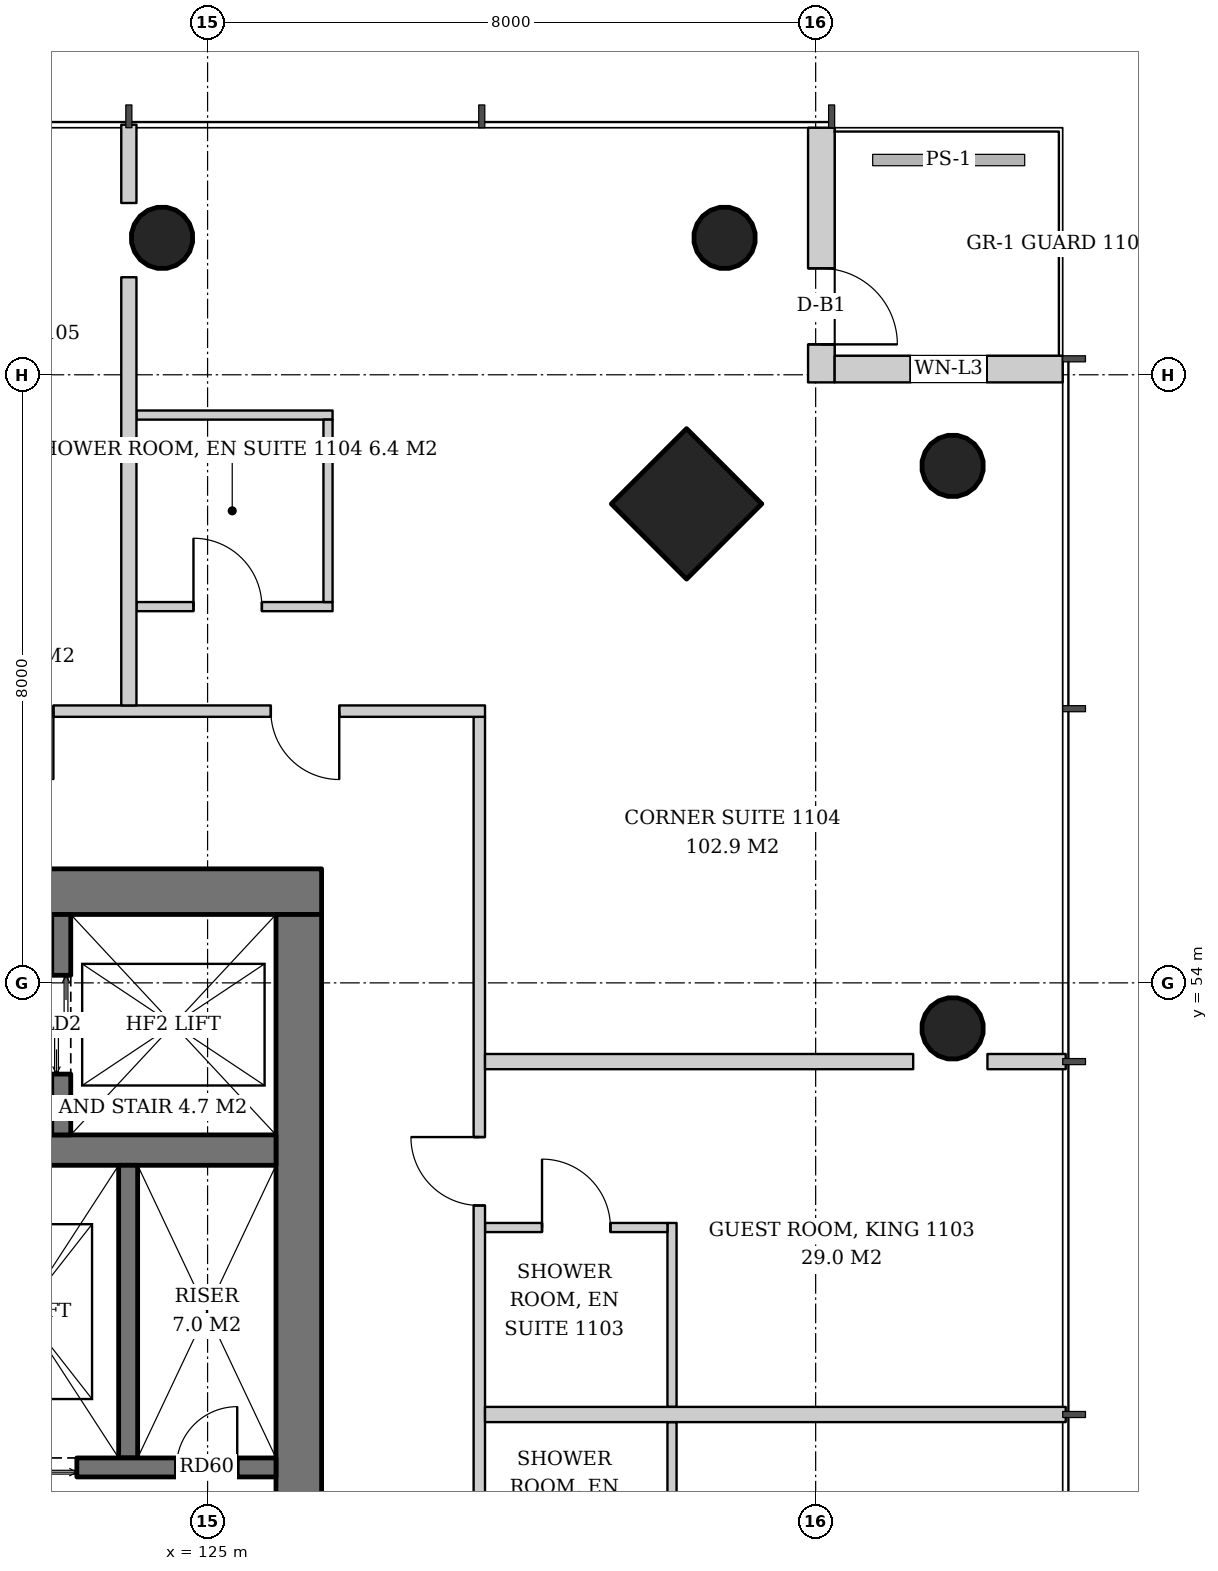
"""IFC4 building model, lengths in metres.
Left out: names, types, materials, properties, quantities, classifications, styles, units other than length and angle.
Written with IfcOpenShell. Run it as: python <this file> out.ifc"""

import sys

from ifc_helpers import new_model, si_unit, direction, frame, frame_2d, origin, origin_2d, place, context, subcontext, project, spatial, rectangle, hollow_circle, extrude, element, fill, save


model = new_model("IFC4")
c1 = context("Model", 3, precision=1e-05, world=origin(), true_north=direction((0.0, 1.0)))
c2 = subcontext(c1, "Body", "Model", "MODEL_VIEW")
j1 = project(units=[si_unit("LENGTHUNIT", "METRE"), si_unit("PLANEANGLEUNIT", "RADIAN")], contexts=[c1])
p1 = place(None, origin())
s1 = spatial("IfcSite", under=j1, at=p1, CompositionType="ELEMENT")
p2 = place(p1, origin())
s2 = spatial("IfcBuilding", under=s1, at=p2, CompositionType="ELEMENT")
p3 = place(p2, frame((0.0, 0.0, 47.6)))
s3 = spatial("IfcBuildingStorey", under=s2, at=p3, CompositionType="ELEMENT", Elevation=47.6)
p4 = place(p3, frame((131.354, 60.354, 0.0), z_axis=(-0.043032401563, -0.043032401563, 0.998146494675), x_axis=(0.707106781187, -0.707106781187, 0.0)))
e1 = element("IfcColumn", 1, at=p4, inside=s3, PredefinedType="COLUMN", context=c2, shape_type="SweptSolid", body=[
    extrude(rectangle(XDim=1.4, YDim=1.4, at=origin_2d()), origin(), (0.0, 0.0, 1.0), 3.807),
])
p5 = place(p3, frame((134.854, 60.854, 0.0), z_axis=(-0.043032401563, -0.043032401563, 0.998146494675), x_axis=(0.707106781187, -0.707106781187, 0.0)))
e2 = element("IfcColumn", 2, at=p5, inside=s3, PredefinedType="COLUMN", context=c2, shape_type="SweptSolid", body=[
    extrude(hollow_circle(Radius=0.406, WallThickness=0.03, at=origin_2d()), origin(), (0.0, 0.0, 1.0), 3.807),
])
p6 = place(p3, frame((134.854, 53.427, 0.0), z_axis=(-0.043062285527, -0.021563230905, 0.998839660125), x_axis=(0.44774654769, -0.894160516368, 0.0)))
e3 = element("IfcColumn", 3, at=p6, inside=s3, PredefinedType="COLUMN", context=c2, shape_type="SweptSolid", body=[
    extrude(hollow_circle(Radius=0.406, WallThickness=0.03, at=origin_2d()), origin(), (0.0, 0.0, 1.0), 3.804),
])
p7 = place(p3, frame((131.854, 63.854, 0.0), z_axis=(-0.043032401563, -0.043032401563, 0.998146494675), x_axis=(0.707106781187, -0.707106781187, 0.0)))
e4 = element("IfcColumn", 4, at=p7, inside=s3, PredefinedType="COLUMN", context=c2, shape_type="SweptSolid", body=[
    extrude(hollow_circle(Radius=0.406, WallThickness=0.03, at=origin_2d()), origin(), (0.0, 0.0, 1.0), 3.807),
])
p8 = place(p3, frame((124.427, 63.854, 0.0), z_axis=(-0.021563230905, -0.043062285527, 0.998839660125), x_axis=(0.894160516368, -0.44774654769, 0.0)))
e5 = element("IfcColumn", 5, at=p8, inside=s3, PredefinedType="COLUMN", context=c2, shape_type="SweptSolid", body=[
    extrude(hollow_circle(Radius=0.406, WallThickness=0.03, at=origin_2d()), origin(), (0.0, 0.0, 1.0), 3.804),
])
p9 = place(p3, frame((107.5, 55.2, 0.0), z_axis=(0.0, 0.0, 1.0), x_axis=(1.0, 0.0, 0.0)))
e6 = element("IfcWall", 6, at=p9, inside=s3, PredefinedType="SHEAR", context=c2, shape_type="SweptSolid", body=[
    extrude(rectangle(XDim=19.0, YDim=0.6, at=frame_2d((9.5, 0.0))), origin(), (0.0, 0.0, 1.0), 3.8),
])
p10 = place(p9, frame((14.14, 0.0, 0.0)))
e7 = element("IfcOpeningElement", 7, at=p10, cuts=e6, PredefinedType="OPENING", context=c2, shape_type="SweptSolid", body=[
    extrude(rectangle(XDim=1.0, YDim=2.1, at=frame_2d((0.5, 1.05))), frame((0.0, 0.31, 0.0), z_axis=(0.0, -1.0, 0.0), x_axis=(1.0, 0.0, 0.0)), (0.0, 0.0, 1.0), 0.62),
])
p11 = place(p9, frame((1.675, 0.0, 0.0)))
e8 = element("IfcOpeningElement", 8, at=p11, cuts=e6, PredefinedType="OPENING", context=c2, shape_type="SweptSolid", body=[
    extrude(rectangle(XDim=1.0, YDim=2.1, at=frame_2d((0.5, 1.05))), frame((0.0, 0.31, 0.0), z_axis=(0.0, -1.0, 0.0), x_axis=(1.0, 0.0, 0.0)), (0.0, 0.0, 1.0), 0.62),
])
p12 = place(p9, frame((3.587, 0.0, 0.0)))
e9 = element("IfcOpeningElement", 9, at=p12, cuts=e6, PredefinedType="OPENING", context=c2, shape_type="SweptSolid", body=[
    extrude(rectangle(XDim=1.0, YDim=2.1, at=frame_2d((0.5, 1.05))), frame((0.0, 0.31, 0.0), z_axis=(0.0, -1.0, 0.0), x_axis=(1.0, 0.0, 0.0)), (0.0, 0.0, 1.0), 0.62),
])
p13 = place(p3, frame((126.2, 37.1, 0.0), z_axis=(0.0, 0.0, 1.0), x_axis=(0.0, 1.0, 0.0)))
e10 = element("IfcWall", 10, at=p13, inside=s3, PredefinedType="SHEAR", context=c2, shape_type="SweptSolid", body=[
    extrude(rectangle(XDim=17.8, YDim=0.6, at=frame_2d((8.9, 0.0))), origin(), (0.0, 0.0, 1.0), 3.8),
])
p14 = place(p13, frame((8.0, 0.0, 0.0)))
e11 = element("IfcOpeningElement", 11, at=p14, cuts=e10, PredefinedType="OPENING", context=c2, shape_type="SweptSolid", body=[
    extrude(rectangle(XDim=1.8, YDim=2.4, at=frame_2d((0.9, 1.2))), frame((0.0, 0.31, 0.0), z_axis=(0.0, -1.0, 0.0), x_axis=(1.0, 0.0, 0.0)), (0.0, 0.0, 1.0), 0.62),
])
p15 = place(p3, frame((108.1, 51.8, 0.0), z_axis=(0.0, 0.0, 1.0), x_axis=(1.0, 0.0, 0.0)))
e12 = element("IfcWall", 12, at=p15, inside=s3, PredefinedType="SHEAR", context=c2, shape_type="SweptSolid", body=[
    extrude(rectangle(XDim=17.8, YDim=0.4, at=frame_2d((8.9, 0.0))), origin(), (0.0, 0.0, 1.0), 3.8),
])
p16 = place(p3, frame((133.075, 65.25, 0.0), z_axis=(0.0, 0.0, 1.0), x_axis=(0.0, -1.0, 0.0)))
e13 = element("IfcWall", 13, at=p16, inside=s3, PredefinedType="SOLIDWALL", context=c2, shape_type="SweptSolid", body=[
    extrude(rectangle(XDim=3.35, YDim=0.35, at=frame_2d((1.675, 0.0))), origin(), (0.0, 0.0, 1.0), 3.6),
])
p17 = place(p16, frame((1.85, 0.0, 0.0)))
e14 = element("IfcOpeningElement", 14, at=p17, cuts=e13, PredefinedType="OPENING", context=c2, shape_type="SweptSolid", body=[
    extrude(rectangle(XDim=1.0, YDim=2.4, at=frame_2d((0.5, 1.2))), frame((0.0, 0.185, 0.0), z_axis=(0.0, -1.0, 0.0), x_axis=(1.0, 0.0, 0.0)), (0.0, 0.0, 1.0), 0.37),
])
p18 = place(p3, frame((133.25, 62.075, 0.0), z_axis=(0.0, 0.0, 1.0), x_axis=(1.0, 0.0, 0.0)))
e15 = element("IfcWall", 15, at=p18, inside=s3, PredefinedType="SOLIDWALL", context=c2, shape_type="SweptSolid", body=[
    extrude(rectangle(XDim=3.0, YDim=0.35, at=frame_2d((1.5, 0.0))), origin(), (0.0, 0.0, 1.0), 3.6),
])
p19 = place(p18, frame((1.0, 0.0, 0.9)))
e16 = element("IfcOpeningElement", 16, at=p19, cuts=e15, PredefinedType="OPENING", context=c2, shape_type="SweptSolid", body=[
    extrude(rectangle(XDim=1.0, YDim=2.4, at=frame_2d((0.5, 1.2))), frame((0.0, 0.185, 0.0), z_axis=(0.0, -1.0, 0.0), x_axis=(1.0, 0.0, 0.0)), (0.0, 0.0, 1.0), 0.37),
])
p20 = place(p3, frame((123.075, 52.0, 0.0), z_axis=(0.0, 0.0, 1.0), x_axis=(0.0, 1.0, 0.0)))
e17 = element("IfcWall", 17, at=p20, inside=s3, PredefinedType="SHEAR", context=c2, shape_type="SweptSolid", body=[
    extrude(rectangle(XDim=2.9, YDim=0.25, at=frame_2d((1.45, 0.0))), origin(), (0.0, 0.0, 1.0), 3.8),
])
p21 = place(p20, frame((0.8, 0.0, 0.0)))
e18 = element("IfcOpeningElement", 18, at=p21, cuts=e17, PredefinedType="OPENING", context=c2, shape_type="SweptSolid", body=[
    extrude(rectangle(XDim=1.3, YDim=2.2, at=frame_2d((0.65, 1.1))), frame((0.0, 0.135, 0.0), z_axis=(0.0, -1.0, 0.0), x_axis=(1.0, 0.0, 0.0)), (0.0, 0.0, 1.0), 0.27),
])
p22 = place(p3, frame((123.955, 47.75, 0.0), z_axis=(0.0, 0.0, 1.0), x_axis=(0.0, 1.0, 0.0)))
e19 = element("IfcWall", 19, at=p22, inside=s3, PredefinedType="SHEAR", context=c2, shape_type="SweptSolid", body=[
    extrude(rectangle(XDim=3.85, YDim=0.25, at=frame_2d((1.925, 0.0))), origin(), (0.0, 0.0, 1.0), 3.8),
])
p23 = place(p3, frame((121.33, 47.625, 0.0), z_axis=(0.0, 0.0, 1.0), x_axis=(1.0, 0.0, 0.0)))
e20 = element("IfcWall", 20, at=p23, inside=s3, PredefinedType="SHEAR", context=c2, shape_type="SweptSolid", body=[
    extrude(rectangle(XDim=4.57, YDim=0.25, at=frame_2d((2.285, 0.0))), origin(), (0.0, 0.0, 1.0), 3.8),
])
p24 = place(p23, frame((0.55, 0.0, 0.0)))
e21 = element("IfcOpeningElement", 21, at=p24, cuts=e20, PredefinedType="OPENING", context=c2, shape_type="SweptSolid", body=[
    extrude(rectangle(XDim=1.4, YDim=2.4, at=frame_2d((0.7, 1.2))), frame((0.0, 0.135, 0.0), z_axis=(0.0, -1.0, 0.0), x_axis=(1.0, 0.0, 0.0)), (0.0, 0.0, 1.0), 0.27),
])
p25 = place(p23, frame((3.26, 0.0, 0.0)))
e22 = element("IfcOpeningElement", 22, at=p25, cuts=e20, PredefinedType="OPENING", context=c2, shape_type="SweptSolid", body=[
    extrude(rectangle(XDim=0.8, YDim=2.0, at=frame_2d((0.4, 1.0))), frame((0.0, 0.135, 0.0), z_axis=(0.0, -1.0, 0.0), x_axis=(1.0, 0.0, 0.0)), (0.0, 0.0, 1.0), 0.27),
])
for number, where, z_axis, x_axis in (
    (23, (131.11, 45.802, 0.0), (0.0, 0.0, 1.0), (0.0, 1.0, 0.0)),
    (24, (131.11, 48.421, 0.0), (0.0, 0.0, 1.0), (0.0, 1.0, 0.0)),
):
    element("IfcWall", number, at=place(p3, frame(where, z_axis=z_axis, x_axis=x_axis)), inside=s3, PredefinedType="PARTITIONING", context=c2, shape_type="SweptSolid", body=[
        extrude(rectangle(XDim=2.42, YDim=0.12, at=frame_2d((1.21, 0.0))), origin(), (0.0, 0.0, 1.0), 2.847),
    ])
p26 = place(p3, frame((128.65, 50.781, 0.0), z_axis=(0.0, 0.0, 1.0), x_axis=(1.0, 0.0, 0.0)))
e25 = element("IfcWall", 25, at=p26, inside=s3, PredefinedType="PARTITIONING", context=c2, shape_type="SweptSolid", body=[
    extrude(rectangle(XDim=2.4, YDim=0.12, at=frame_2d((1.2, 0.0))), origin(), (0.0, 0.0, 1.0), 3.6),
])
p27 = place(p26, frame((0.75, 0.0, 0.0)))
e26 = element("IfcOpeningElement", 26, at=p27, cuts=e25, PredefinedType="OPENING", context=c2, shape_type="SweptSolid", body=[
    extrude(rectangle(XDim=0.9, YDim=2.1, at=frame_2d((0.45, 1.05))), frame((0.0, 0.07, 0.0), z_axis=(0.0, -1.0, 0.0), x_axis=(1.0, 0.0, 0.0)), (0.0, 0.0, 1.0), 0.14),
])
p28 = place(p3, frame((128.575, 34.35, 0.0), z_axis=(0.0, 0.0, 1.0), x_axis=(0.0, 1.0, 0.0)))
e27 = element("IfcWall", 27, at=p28, inside=s3, PredefinedType="PARTITIONING", context=c2, shape_type="SweptSolid", body=[
    extrude(rectangle(XDim=23.15, YDim=0.15, at=frame_2d((11.575, 0.0))), origin(), (0.0, 0.0, 1.0), 2.8),
])
p29 = place(p28, frame((1.918, 0.0, 0.0)))
e28 = element("IfcOpeningElement", 28, at=p29, cuts=e27, PredefinedType="OPENING", context=c2, shape_type="SweptSolid", body=[
    extrude(rectangle(XDim=0.9, YDim=2.1, at=frame_2d((0.45, 1.05))), frame((0.0, 0.085, 0.0), z_axis=(0.0, -1.0, 0.0), x_axis=(1.0, 0.0, 0.0)), (0.0, 0.0, 1.0), 0.17),
])
p30 = place(p28, frame((10.322, 0.0, 0.0)))
e29 = element("IfcOpeningElement", 29, at=p30, cuts=e27, PredefinedType="OPENING", context=c2, shape_type="SweptSolid", body=[
    extrude(rectangle(XDim=0.9, YDim=2.1, at=frame_2d((0.45, 1.05))), frame((0.0, 0.085, 0.0), z_axis=(0.0, -1.0, 0.0), x_axis=(1.0, 0.0, 0.0)), (0.0, 0.0, 1.0), 0.17),
])
p31 = place(p28, frame((16.721, 0.0, 0.0)))
e30 = element("IfcOpeningElement", 30, at=p31, cuts=e27, PredefinedType="OPENING", context=c2, shape_type="SweptSolid", body=[
    extrude(rectangle(XDim=0.9, YDim=2.1, at=frame_2d((0.45, 1.05))), frame((0.0, 0.085, 0.0), z_axis=(0.0, -1.0, 0.0), x_axis=(1.0, 0.0, 0.0)), (0.0, 0.0, 1.0), 0.17),
])
p32 = place(p3, frame((128.65, 48.322, 0.0), z_axis=(0.0, 0.0, 1.0), x_axis=(1.0, 0.0, 0.0)))
e31 = element("IfcWall", 31, at=p32, inside=s3, PredefinedType="PARTITIONING", context=c2, shape_type="SweptSolid", body=[
    extrude(rectangle(XDim=7.64, YDim=0.2, at=frame_2d((3.82, 0.0))), origin(), (0.0, 0.0, 1.0), 3.05),
])
p33 = place(p3, frame((128.65, 52.964, 0.0), z_axis=(0.0, 0.0, 1.0), x_axis=(1.0, 0.0, 0.0)))
e32 = element("IfcWall", 32, at=p33, inside=s3, PredefinedType="PARTITIONING", context=c2, shape_type="SweptSolid", body=[
    extrude(rectangle(XDim=5.633, YDim=0.2, at=frame_2d((2.817, 0.0))), origin(), (0.0, 0.0, 1.0), 3.6),
])
p34 = place(p3, frame((135.26, 52.964, 0.0), z_axis=(0.0, 0.0, 1.0), x_axis=(1.0, 0.0, 0.0)))
e33 = element("IfcWall", 33, at=p34, inside=s3, PredefinedType="PARTITIONING", context=c2, shape_type="SweptSolid", body=[
    extrude(rectangle(XDim=1.03, YDim=0.2, at=frame_2d((0.515, 0.0))), origin(), (0.0, 0.0, 1.0), 3.6),
])
p35 = place(p3, frame((124.064, 58.95, 0.0), z_axis=(0.0, 0.0, 1.0), x_axis=(1.0, 0.0, 0.0)))
e34 = element("IfcWall", 34, at=p35, inside=s3, PredefinedType="PARTITIONING", context=c2, shape_type="SweptSolid", body=[
    extrude(rectangle(XDim=2.58, YDim=0.12, at=frame_2d((1.29, 0.0))), origin(), (0.0, 0.0, 1.0), 2.8),
])
p36 = place(p35, frame((0.75, 0.0, 0.0)))
e35 = element("IfcOpeningElement", 35, at=p36, cuts=e34, PredefinedType="OPENING", context=c2, shape_type="SweptSolid", body=[
    extrude(rectangle(XDim=0.9, YDim=2.1, at=frame_2d((0.45, 1.05))), frame((0.0, 0.07, 0.0), z_axis=(0.0, -1.0, 0.0), x_axis=(1.0, 0.0, 0.0)), (0.0, 0.0, 1.0), 0.14),
])
p37 = place(p3, frame((124.064, 61.47, 0.0), z_axis=(0.0, 0.0, 1.0), x_axis=(1.0, 0.0, 0.0)))
e36 = element("IfcWall", 36, at=p37, inside=s3, PredefinedType="PARTITIONING", context=c2, shape_type="SweptSolid", body=[
    extrude(rectangle(XDim=2.58, YDim=0.12, at=frame_2d((1.29, 0.0))), origin(), (0.0, 0.0, 1.0), 2.8),
])
p38 = place(p3, frame((126.584, 59.01, 0.0), z_axis=(0.0, 0.0, 1.0), x_axis=(0.0, 1.0, 0.0)))
e37 = element("IfcWall", 37, at=p38, inside=s3, PredefinedType="PARTITIONING", context=c2, shape_type="SweptSolid", body=[
    extrude(rectangle(XDim=2.4, YDim=0.12, at=frame_2d((1.2, 0.0))), origin(), (0.0, 0.0, 1.0), 2.847),
])
p39 = place(p3, frame((128.65, 57.575, 0.0), z_axis=(0.0, 0.0, 1.0), x_axis=(-1.0, 0.0, 0.0)))
e38 = element("IfcWall", 38, at=p39, inside=s3, PredefinedType="PARTITIONING", context=c2, shape_type="SweptSolid", body=[
    extrude(rectangle(XDim=23.15, YDim=0.15, at=frame_2d((11.575, 0.0))), origin(), (0.0, 0.0, 1.0), 2.8),
])
p40 = place(p39, frame((1.918, 0.0, 0.0)))
e39 = element("IfcOpeningElement", 39, at=p40, cuts=e38, PredefinedType="OPENING", context=c2, shape_type="SweptSolid", body=[
    extrude(rectangle(XDim=0.9, YDim=2.1, at=frame_2d((0.45, 1.05))), frame((0.0, 0.085, 0.0), z_axis=(0.0, -1.0, 0.0), x_axis=(1.0, 0.0, 0.0)), (0.0, 0.0, 1.0), 0.17),
])
p41 = place(p39, frame((5.678, 0.0, 0.0)))
e40 = element("IfcOpeningElement", 40, at=p41, cuts=e38, PredefinedType="OPENING", context=c2, shape_type="SweptSolid", body=[
    extrude(rectangle(XDim=0.9, YDim=2.1, at=frame_2d((0.45, 1.05))), frame((0.0, 0.085, 0.0), z_axis=(0.0, -1.0, 0.0), x_axis=(1.0, 0.0, 0.0)), (0.0, 0.0, 1.0), 0.17),
])
p42 = place(p39, frame((12.079, 0.0, 0.0)))
e41 = element("IfcOpeningElement", 41, at=p42, cuts=e38, PredefinedType="OPENING", context=c2, shape_type="SweptSolid", body=[
    extrude(rectangle(XDim=0.9, YDim=2.1, at=frame_2d((0.45, 1.05))), frame((0.0, 0.085, 0.0), z_axis=(0.0, -1.0, 0.0), x_axis=(1.0, 0.0, 0.0)), (0.0, 0.0, 1.0), 0.17),
])
p43 = place(p3, frame((123.964, 57.65, 0.0), z_axis=(0.0, 0.0, 1.0), x_axis=(0.0, 1.0, 0.0)))
e42 = element("IfcWall", 42, at=p43, inside=s3, PredefinedType="PARTITIONING", context=c2, shape_type="SweptSolid", body=[
    extrude(rectangle(XDim=5.633, YDim=0.2, at=frame_2d((2.817, 0.0))), origin(), (0.0, 0.0, 1.0), 3.6),
])
p44 = place(p3, frame((123.964, 64.26, 0.0), z_axis=(0.0, 0.0, 1.0), x_axis=(0.0, 1.0, 0.0)))
e43 = element("IfcWall", 43, at=p44, inside=s3, PredefinedType="PARTITIONING", context=c2, shape_type="SweptSolid", body=[
    extrude(rectangle(XDim=1.03, YDim=0.2, at=frame_2d((0.515, 0.0))), origin(), (0.0, 0.0, 1.0), 3.6),
])
p45 = place(p17, origin())
e44 = element("IfcDoor", 44, at=p45, inside=s3, OperationType="SINGLE_SWING_RIGHT", PredefinedType="DOOR", context=c2, shape_type="SweptSolid", body=[
    extrude(rectangle(XDim=1.0, YDim=2.4, at=frame_2d((0.5, 1.2))), frame((0.0, 0.025, 0.0), z_axis=(0.0, -1.0, 0.0), x_axis=(1.0, 0.0, 0.0)), (0.0, 0.0, 1.0), 0.05),
])
fill(e14, e44)
p46 = place(p19, origin())
e45 = element("IfcWindow", 45, at=p46, inside=s3, PartitioningType="SINGLE_PANEL", PredefinedType="WINDOW", context=c2, shape_type="SweptSolid", body=[
    extrude(rectangle(XDim=1.0, YDim=2.4, at=frame_2d((0.5, 1.2))), frame((0.0, 0.03, 0.0), z_axis=(0.0, -1.0, 0.0), x_axis=(1.0, 0.0, 0.0)), (0.0, 0.0, 1.0), 0.06),
])
fill(e16, e45)
p47 = place(p21, origin())
e46 = element("IfcDoor", 46, at=p47, inside=s3, OperationType="DOUBLE_DOOR_SLIDING", PredefinedType="DOOR", context=c2, shape_type="SweptSolid", body=[
    extrude(rectangle(XDim=1.3, YDim=2.2, at=frame_2d((0.65, 1.1))), frame((0.0, 0.025, 0.0), z_axis=(0.0, -1.0, 0.0), x_axis=(1.0, 0.0, 0.0)), (0.0, 0.0, 1.0), 0.05),
])
fill(e18, e46)
p48 = place(p24, origin())
e47 = element("IfcDoor", 47, at=p48, inside=s3, OperationType="DOUBLE_DOOR_SLIDING", PredefinedType="DOOR", context=c2, shape_type="SweptSolid", body=[
    extrude(rectangle(XDim=1.4, YDim=2.4, at=frame_2d((0.7, 1.2))), frame((0.0, 0.025, 0.0), z_axis=(0.0, -1.0, 0.0), x_axis=(1.0, 0.0, 0.0)), (0.0, 0.0, 1.0), 0.05),
])
fill(e21, e47)
p49 = place(p25, origin())
e48 = element("IfcDoor", 48, at=p49, inside=s3, OperationType="SINGLE_SWING_RIGHT", PredefinedType="DOOR", context=c2, shape_type="SweptSolid", body=[
    extrude(rectangle(XDim=0.8, YDim=2.0, at=frame_2d((0.4, 1.0))), frame((0.0, 0.025, 0.0), z_axis=(0.0, -1.0, 0.0), x_axis=(1.0, 0.0, 0.0)), (0.0, 0.0, 1.0), 0.05),
])
fill(e22, e48)
p50 = place(p27, origin())
e49 = element("IfcDoor", 49, at=p50, inside=s3, OperationType="SINGLE_SWING_LEFT", PredefinedType="DOOR", context=c2, shape_type="SweptSolid", body=[
    extrude(rectangle(XDim=0.9, YDim=2.1, at=frame_2d((0.45, 1.05))), frame((0.0, 0.025, 0.0), z_axis=(0.0, -1.0, 0.0), x_axis=(1.0, 0.0, 0.0)), (0.0, 0.0, 1.0), 0.05),
])
fill(e26, e49)
p51 = place(p31, origin())
e50 = element("IfcDoor", 50, at=p51, inside=s3, OperationType="SINGLE_SWING_RIGHT", PredefinedType="DOOR", context=c2, shape_type="SweptSolid", body=[
    extrude(rectangle(XDim=0.9, YDim=2.1, at=frame_2d((0.45, 1.05))), frame((0.0, 0.025, 0.0), z_axis=(0.0, -1.0, 0.0), x_axis=(1.0, 0.0, 0.0)), (0.0, 0.0, 1.0), 0.05),
])
fill(e30, e50)
p52 = place(p36, origin())
e51 = element("IfcDoor", 51, at=p52, inside=s3, OperationType="SINGLE_SWING_LEFT", PredefinedType="DOOR", context=c2, shape_type="SweptSolid", body=[
    extrude(rectangle(XDim=0.9, YDim=2.1, at=frame_2d((0.45, 1.05))), frame((0.0, 0.025, 0.0), z_axis=(0.0, -1.0, 0.0), x_axis=(1.0, 0.0, 0.0)), (0.0, 0.0, 1.0), 0.05),
])
fill(e35, e51)
p53 = place(p40, origin())
e52 = element("IfcDoor", 52, at=p53, inside=s3, OperationType="SINGLE_SWING_LEFT", PredefinedType="DOOR", context=c2, shape_type="SweptSolid", body=[
    extrude(rectangle(XDim=0.9, YDim=2.1, at=frame_2d((0.45, 1.05))), frame((0.0, 0.025, 0.0), z_axis=(0.0, -1.0, 0.0), x_axis=(1.0, 0.0, 0.0)), (0.0, 0.0, 1.0), 0.05),
])
fill(e39, e52)
p54 = place(p41, origin())
e53 = element("IfcDoor", 53, at=p54, inside=s3, OperationType="SINGLE_SWING_LEFT", PredefinedType="DOOR", context=c2, shape_type="SweptSolid", body=[
    extrude(rectangle(XDim=0.9, YDim=2.1, at=frame_2d((0.45, 1.05))), frame((0.0, 0.025, 0.0), z_axis=(0.0, -1.0, 0.0), x_axis=(1.0, 0.0, 0.0)), (0.0, 0.0, 1.0), 0.05),
])
fill(e40, e53)
save(model, sys.argv[1])
